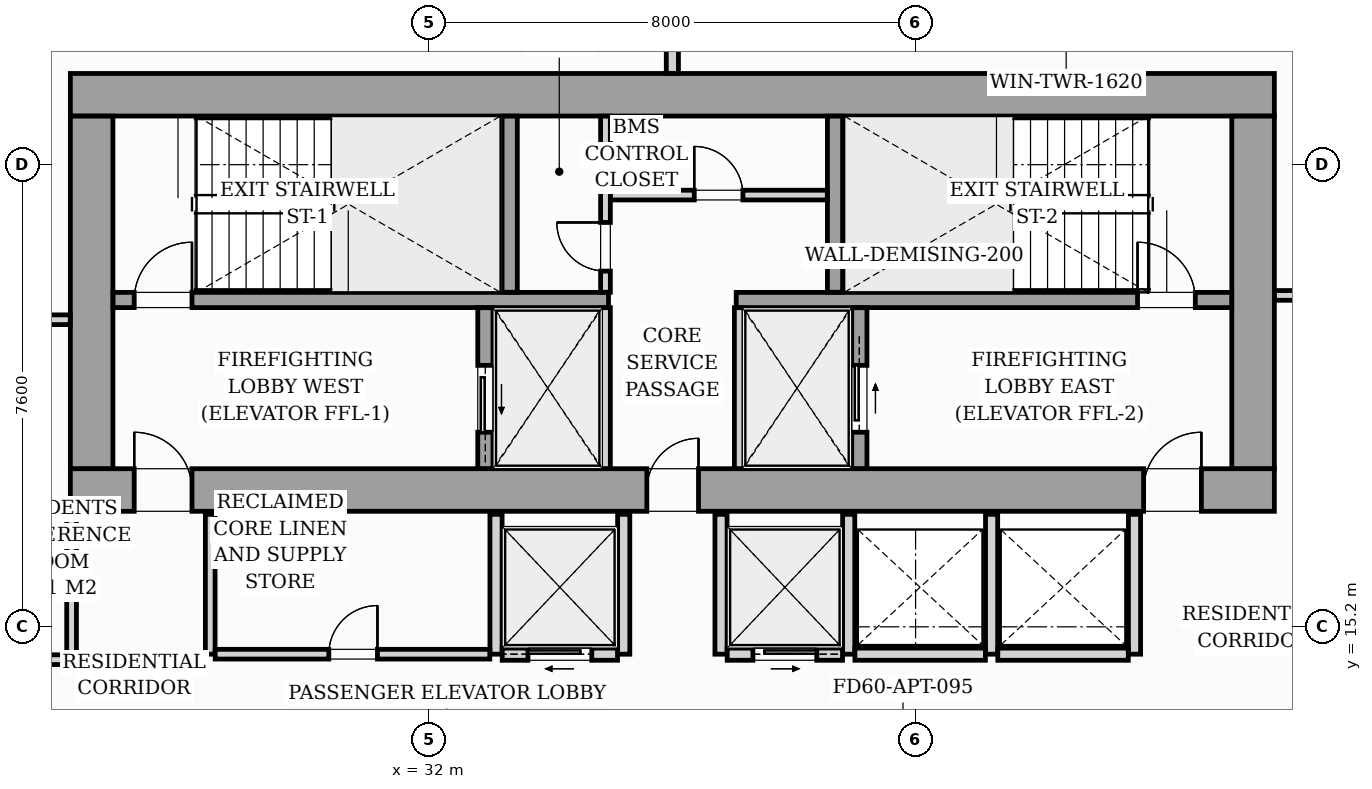
"""IFC4 building model, lengths in metres.
Left out: names, types, materials, properties, quantities, classifications, styles, units other than length and angle.
Written with IfcOpenShell. Run it as: python <this file> out.ifc"""

import sys

from ifc_helpers import new_model, si_unit, direction, frame, frame_2d, origin, origin_2d, place, context, subcontext, project, spatial, rectangle, i_section, extrude, source, transform, mapped, element, fill, save


model = new_model("IFC4")
c1 = context("Model", 3, precision=1e-05, world=origin(), true_north=direction((0.0, 1.0)))
c2 = subcontext(c1, "Body", "Model", "MODEL_VIEW")
j1 = project(units=[si_unit("LENGTHUNIT", "METRE"), si_unit("PLANEANGLEUNIT", "RADIAN")], contexts=[c1])
p1 = place(None, origin())
s1 = spatial("IfcSite", under=j1, at=p1, CompositionType="ELEMENT")
p2 = place(p1, origin())
s2 = spatial("IfcBuilding", under=s1, at=p2, CompositionType="ELEMENT")
p3 = place(p2, frame((0.0, 0.0, 143.8)))
s3 = spatial("IfcBuildingStorey", under=s2, at=p3, CompositionType="ELEMENT", Elevation=143.8)
m1 = source(origin(), c2, "Body", "SweptSolid", [
    extrude(i_section(OverallWidth=0.421, OverallDepth=0.465, WebThickness=0.045, FlangeThickness=0.073, FilletRadius=0.018, at=origin_2d()), origin(), (0.0, 0.0, 1.0), 3.196),
])
for number, where, z_axis, x_axis in (
    (1, (26.4, 17.4, 0.002), (0.0, 0.0, 1.0), (1.0, 0.0, 0.0)),
    (2, (33.12, 17.4, 0.002), (0.0, 0.0, 1.0), (1.0, 0.0, 0.0)),
    (3, (38.88, 17.4, 0.002), (0.0, 0.0, 1.0), (1.0, 0.0, 0.0)),
    (4, (45.6, 17.4, 0.002), (0.0, 0.0, 1.0), (1.0, 0.0, 0.0)),
    (5, (26.4, 24.0, 0.002), (0.0, 0.0, 1.0), (1.0, 0.0, 0.0)),
    (6, (33.12, 24.0, 0.002), (0.0, 0.0, 1.0), (1.0, 0.0, 0.0)),
    (7, (38.88, 24.0, 0.002), (0.0, 0.0, 1.0), (1.0, 0.0, 0.0)),
    (8, (45.6, 24.0, 0.002), (0.0, 0.0, 1.0), (1.0, 0.0, 0.0)),
):
    element("IfcColumn", number, at=place(p3, frame(where, z_axis=z_axis, x_axis=x_axis)), inside=s3, PredefinedType="PILASTER", context=c2, shape_type="MappedRepresentation", body=[
        mapped(m1, transform((0.0, 0.0, 0.0), scale=1.0)),
    ])
p4 = place(p3, frame((40.983, 25.727, 0.0), z_axis=(0.0, 0.0, 1.0), x_axis=(0.995395844771, -0.095849424686, 0.0)))
e9 = element("IfcWall", 9, at=p4, inside=s3, PredefinedType="STANDARD", context=c2, shape_type="SweptSolid", body=[
    extrude(rectangle(XDim=17.01, YDim=0.26, at=frame_2d((8.505, 0.0))), origin(), (0.0, 0.0, 1.0), 2.94),
])
p5 = place(p4, frame((9.55, 0.0, 0.0)))
e10 = element("IfcOpeningElement", 10, at=p5, cuts=e9, PredefinedType="OPENING", context=c2, shape_type="SweptSolid", body=[
    extrude(rectangle(XDim=1.8, YDim=2.06, at=frame_2d((0.9, 1.03))), frame((0.0, 0.14, 0.0), z_axis=(0.0, -1.0, 0.0), x_axis=(1.0, 0.0, 0.0)), (0.0, 0.0, 1.0), 0.28),
])
p6 = place(p4, frame((0.7, 0.0, 0.65)))
e11 = element("IfcOpeningElement", 11, at=p6, cuts=e9, PredefinedType="OPENING", context=c2, shape_type="SweptSolid", body=[
    extrude(rectangle(XDim=1.6, YDim=1.5, at=frame_2d((0.8, 0.75))), frame((0.0, 0.14, 0.0), z_axis=(0.0, -1.0, 0.0), x_axis=(1.0, 0.0, 0.0)), (0.0, 0.0, 1.0), 0.28),
])
p7 = place(p3, frame((26.1, 17.45, 0.0), z_axis=(0.0, 0.0, 1.0), x_axis=(1.0, 0.0, 0.0)))
e12 = element("IfcWall", 12, at=p7, inside=s3, PredefinedType="SHEAR", context=c2, shape_type="SweptSolid", body=[
    extrude(rectangle(XDim=19.8, YDim=0.7, at=frame_2d((9.9, 0.0))), origin(), (0.0, 0.0, 1.0), 3.2),
])
p8 = place(p7, frame((1.05, 0.0, 0.0)))
e13 = element("IfcOpeningElement", 13, at=p8, cuts=e12, PredefinedType="OPENING", context=c2, shape_type="SweptSolid", body=[
    extrude(rectangle(XDim=0.95, YDim=2.06, at=frame_2d((0.475, 1.03))), frame((0.0, 0.36, 0.0), z_axis=(0.0, -1.0, 0.0), x_axis=(1.0, 0.0, 0.0)), (0.0, 0.0, 1.0), 0.72),
])
p9 = place(p7, frame((9.48, 0.0, 0.0)))
e14 = element("IfcOpeningElement", 14, at=p9, cuts=e12, PredefinedType="OPENING", context=c2, shape_type="SweptSolid", body=[
    extrude(rectangle(XDim=0.85, YDim=2.0, at=frame_2d((0.425, 1.0))), frame((0.0, 0.36, 0.0), z_axis=(0.0, -1.0, 0.0), x_axis=(1.0, 0.0, 0.0)), (0.0, 0.0, 1.0), 0.72),
])
p10 = place(p7, frame((17.65, 0.0, 0.0)))
e15 = element("IfcOpeningElement", 15, at=p10, cuts=e12, PredefinedType="OPENING", context=c2, shape_type="SweptSolid", body=[
    extrude(rectangle(XDim=0.95, YDim=2.06, at=frame_2d((0.475, 1.03))), frame((0.0, 0.36, 0.0), z_axis=(0.0, -1.0, 0.0), x_axis=(1.0, 0.0, 0.0)), (0.0, 0.0, 1.0), 0.72),
])
p11 = place(p3, frame((26.1, 23.95, 0.0), z_axis=(0.0, 0.0, 1.0), x_axis=(1.0, 0.0, 0.0)))
e16 = element("IfcWall", 16, at=p11, inside=s3, PredefinedType="SHEAR", context=c2, shape_type="SweptSolid", body=[
    extrude(rectangle(XDim=19.8, YDim=0.7, at=frame_2d((9.9, 0.0))), origin(), (0.0, 0.0, 1.0), 3.2),
])
for number, where, z_axis, x_axis in (
    (17, (26.45, 17.802, 0.0), (0.0, 0.0, 1.0), (0.0, 1.0, 0.0)),
    (18, (45.55, 17.802, 0.0), (0.0, 0.0, 1.0), (0.0, 1.0, 0.0)),
):
    element("IfcWall", number, at=place(p3, frame(where, z_axis=z_axis, x_axis=x_axis)), inside=s3, PredefinedType="SHEAR", context=c2, shape_type="SweptSolid", body=[
        extrude(rectangle(XDim=5.796, YDim=0.7, at=frame_2d((2.898, 0.0))), origin(), (0.0, 0.0, 1.0), 3.2),
    ])
p12 = place(p3, frame((26.802, 20.575, 0.0), z_axis=(0.0, 0.0, 1.0), x_axis=(1.0, 0.0, 0.0)))
e19 = element("IfcWall", 19, at=p12, inside=s3, PredefinedType="SOLIDWALL", context=c2, shape_type="SweptSolid", body=[
    extrude(rectangle(XDim=8.148, YDim=0.25, at=frame_2d((4.074, 0.0))), origin(), (0.0, 0.0, 1.0), 3.2),
])
p13 = place(p12, frame((0.348, 0.0, 0.0)))
e20 = element("IfcOpeningElement", 20, at=p13, cuts=e19, PredefinedType="OPENING", context=c2, shape_type="SweptSolid", body=[
    extrude(rectangle(XDim=0.95, YDim=2.06, at=frame_2d((0.475, 1.03))), frame((0.0, 0.135, 0.0), z_axis=(0.0, -1.0, 0.0), x_axis=(1.0, 0.0, 0.0)), (0.0, 0.0, 1.0), 0.27),
])
p14 = place(p3, frame((37.05, 20.575, 0.0), z_axis=(0.0, 0.0, 1.0), x_axis=(1.0, 0.0, 0.0)))
e21 = element("IfcWall", 21, at=p14, inside=s3, PredefinedType="SOLIDWALL", context=c2, shape_type="SweptSolid", body=[
    extrude(rectangle(XDim=8.148, YDim=0.25, at=frame_2d((4.074, 0.0))), origin(), (0.0, 0.0, 1.0), 3.2),
])
p15 = place(p14, frame((6.6, 0.0, 0.0)))
e22 = element("IfcOpeningElement", 22, at=p15, cuts=e21, PredefinedType="OPENING", context=c2, shape_type="SweptSolid", body=[
    extrude(rectangle(XDim=0.95, YDim=2.06, at=frame_2d((0.475, 1.03))), frame((0.0, 0.135, 0.0), z_axis=(0.0, -1.0, 0.0), x_axis=(1.0, 0.0, 0.0)), (0.0, 0.0, 1.0), 0.27),
])
for number, where, z_axis, x_axis in (
    (23, (33.325, 20.702, 0.0), (0.0, 0.0, 1.0), (0.0, 1.0, 0.0)),
    (24, (38.675, 20.702, 0.0), (0.0, 0.0, 1.0), (0.0, 1.0, 0.0)),
):
    element("IfcWall", number, at=place(p3, frame(where, z_axis=z_axis, x_axis=x_axis)), inside=s3, PredefinedType="SOLIDWALL", context=c2, shape_type="SweptSolid", body=[
        extrude(rectangle(XDim=2.896, YDim=0.25, at=frame_2d((1.448, 0.0))), origin(), (0.0, 0.0, 1.0), 3.2),
    ])
p16 = place(p3, frame((32.925, 17.802, 0.0), z_axis=(0.0, 0.0, 1.0), x_axis=(0.0, 1.0, 0.0)))
e25 = element("IfcWall", 25, at=p16, inside=s3, PredefinedType="SOLIDWALL", context=c2, shape_type="SweptSolid", body=[
    extrude(rectangle(XDim=2.646, YDim=0.25, at=frame_2d((1.323, 0.0))), origin(), (0.0, 0.0, 1.0), 3.2),
])
p17 = place(p16, frame((0.598, 0.0, 0.0)))
e26 = element("IfcOpeningElement", 26, at=p17, cuts=e25, PredefinedType="OPENING", context=c2, shape_type="SweptSolid", body=[
    extrude(rectangle(XDim=1.1, YDim=2.08, at=frame_2d((0.55, 1.04))), frame((0.0, 0.135, 0.0), z_axis=(0.0, -1.0, 0.0), x_axis=(1.0, 0.0, 0.0)), (0.0, 0.0, 1.0), 0.27),
])
for number, where, z_axis, x_axis in (
    (27, (34.9, 17.802, 0.0), (0.0, 0.0, 1.0), (0.0, 1.0, 0.0)),
    (28, (37.1, 17.802, 0.0), (0.0, 0.0, 1.0), (0.0, 1.0, 0.0)),
):
    element("IfcWall", number, at=place(p3, frame(where, z_axis=z_axis, x_axis=x_axis)), inside=s3, PredefinedType="PARTITIONING", context=c2, shape_type="SweptSolid", body=[
        extrude(rectangle(XDim=2.646, YDim=0.16, at=frame_2d((1.323, 0.0))), origin(), (0.0, 0.0, 1.0), 2.94),
    ])
p18 = place(p3, frame((39.075, 17.802, 0.0), z_axis=(0.0, 0.0, 1.0), x_axis=(0.0, 1.0, 0.0)))
e29 = element("IfcWall", 29, at=p18, inside=s3, PredefinedType="SOLIDWALL", context=c2, shape_type="SweptSolid", body=[
    extrude(rectangle(XDim=2.646, YDim=0.25, at=frame_2d((1.323, 0.0))), origin(), (0.0, 0.0, 1.0), 3.2),
])
p19 = place(p18, frame((0.598, 0.0, 0.0)))
e30 = element("IfcOpeningElement", 30, at=p19, cuts=e29, PredefinedType="OPENING", context=c2, shape_type="SweptSolid", body=[
    extrude(rectangle(XDim=1.1, YDim=2.08, at=frame_2d((0.55, 1.04))), frame((0.0, 0.135, 0.0), z_axis=(0.0, -1.0, 0.0), x_axis=(1.0, 0.0, 0.0)), (0.0, 0.0, 1.0), 0.27),
])
p20 = place(p3, frame((34.9, 20.702, 0.0), z_axis=(0.0, 0.0, 1.0), x_axis=(0.0, 1.0, 0.0)))
e31 = element("IfcWall", 31, at=p20, inside=s3, PredefinedType="PARTITIONING", context=c2, shape_type="SweptSolid", body=[
    extrude(rectangle(XDim=2.896, YDim=0.16, at=frame_2d((1.448, 0.0))), origin(), (0.0, 0.0, 1.0), 2.94),
])
p21 = place(p20, frame((0.348, 0.0, 0.0)))
e32 = element("IfcOpeningElement", 32, at=p21, cuts=e31, PredefinedType="OPENING", context=c2, shape_type="SweptSolid", body=[
    extrude(rectangle(XDim=0.8, YDim=2.05, at=frame_2d((0.4, 1.025))), frame((0.0, 0.09, 0.0), z_axis=(0.0, -1.0, 0.0), x_axis=(1.0, 0.0, 0.0)), (0.0, 0.0, 1.0), 0.18),
])
p22 = place(p3, frame((34.982, 22.3, 0.0), z_axis=(0.0, 0.0, 1.0), x_axis=(1.0, 0.0, 0.0)))
e33 = element("IfcWall", 33, at=p22, inside=s3, PredefinedType="PARTITIONING", context=c2, shape_type="SweptSolid", body=[
    extrude(rectangle(XDim=3.566, YDim=0.16, at=frame_2d((1.783, 0.0))), origin(), (0.0, 0.0, 1.0), 2.94),
])
p23 = place(p22, frame((1.378, 0.0, 0.0)))
e34 = element("IfcOpeningElement", 34, at=p23, cuts=e33, PredefinedType="OPENING", context=c2, shape_type="SweptSolid", body=[
    extrude(rectangle(XDim=0.8, YDim=2.05, at=frame_2d((0.4, 1.025))), frame((0.0, 0.09, 0.0), z_axis=(0.0, -1.0, 0.0), x_axis=(1.0, 0.0, 0.0)), (0.0, 0.0, 1.0), 0.18),
])
p24 = place(p3, frame((28.4, 14.75, 0.0), z_axis=(0.0, 0.0, 1.0), x_axis=(0.0, 1.0, 0.0)))
e35 = element("IfcWall", 35, at=p24, inside=s3, PredefinedType="PARTITIONING", context=c2, shape_type="SweptSolid", body=[
    extrude(rectangle(XDim=2.3, YDim=0.16, at=frame_2d((1.15, 0.0))), origin(), (0.0, 0.0, 1.0), 2.94),
])
p25 = place(p3, frame((33.1, 14.75, 0.0), z_axis=(0.0, 0.0, 1.0), x_axis=(0.0, 1.0, 0.0)))
e36 = element("IfcWall", 36, at=p25, inside=s3, PredefinedType="PARTITIONING", context=c2, shape_type="SweptSolid", body=[
    extrude(rectangle(XDim=2.3, YDim=0.2, at=frame_2d((1.15, 0.0))), origin(), (0.0, 0.0, 1.0), 2.94),
])
p26 = place(p3, frame((28.482, 14.75, 0.0), z_axis=(0.0, 0.0, 1.0), x_axis=(1.0, 0.0, 0.0)))
e37 = element("IfcWall", 37, at=p26, inside=s3, PredefinedType="PARTITIONING", context=c2, shape_type="SweptSolid", body=[
    extrude(rectangle(XDim=4.516, YDim=0.16, at=frame_2d((2.258, 0.0))), origin(), (0.0, 0.0, 1.0), 2.94),
])
p27 = place(p26, frame((1.868, 0.0, 0.0)))
e38 = element("IfcOpeningElement", 38, at=p27, cuts=e37, PredefinedType="OPENING", context=c2, shape_type="SweptSolid", body=[
    extrude(rectangle(XDim=0.8, YDim=2.05, at=frame_2d((0.4, 1.025))), frame((0.0, 0.09, 0.0), z_axis=(0.0, -1.0, 0.0), x_axis=(1.0, 0.0, 0.0)), (0.0, 0.0, 1.0), 0.18),
])
p28 = place(p3, frame((35.2, 14.75, 0.0), z_axis=(0.0, 0.0, 1.0), x_axis=(0.0, 1.0, 0.0)))
e39 = element("IfcWall", 39, at=p28, inside=s3, PredefinedType="PARTITIONING", context=c2, shape_type="SweptSolid", body=[
    extrude(rectangle(XDim=2.3, YDim=0.2, at=frame_2d((1.15, 0.0))), origin(), (0.0, 0.0, 1.0), 2.94),
])
p29 = place(p3, frame((33.202, 14.75, 0.0), z_axis=(0.0, 0.0, 1.0), x_axis=(1.0, 0.0, 0.0)))
e40 = element("IfcWall", 40, at=p29, inside=s3, PredefinedType="PARTITIONING", context=c2, shape_type="SweptSolid", body=[
    extrude(rectangle(XDim=1.896, YDim=0.2, at=frame_2d((0.948, 0.0))), origin(), (0.0, 0.0, 1.0), 2.94),
])
p30 = place(p29, frame((0.423, 0.0, 0.0)))
e41 = element("IfcOpeningElement", 41, at=p30, cuts=e40, PredefinedType="OPENING", context=c2, shape_type="SweptSolid", body=[
    extrude(rectangle(XDim=1.05, YDim=2.08, at=frame_2d((0.525, 1.04))), frame((0.0, 0.11, 0.0), z_axis=(0.0, -1.0, 0.0), x_axis=(1.0, 0.0, 0.0)), (0.0, 0.0, 1.0), 0.22),
])
for number, where, z_axis, x_axis in (
    (42, (36.8, 14.75, 0.0), (0.0, 0.0, 1.0), (0.0, 1.0, 0.0)),
    (43, (38.9, 14.75, 0.0), (0.0, 0.0, 1.0), (0.0, 1.0, 0.0)),
):
    element("IfcWall", number, at=place(p3, frame(where, z_axis=z_axis, x_axis=x_axis)), inside=s3, PredefinedType="PARTITIONING", context=c2, shape_type="SweptSolid", body=[
        extrude(rectangle(XDim=2.3, YDim=0.2, at=frame_2d((1.15, 0.0))), origin(), (0.0, 0.0, 1.0), 2.94),
    ])
p31 = place(p3, frame((36.902, 14.75, 0.0), z_axis=(0.0, 0.0, 1.0), x_axis=(1.0, 0.0, 0.0)))
e44 = element("IfcWall", 44, at=p31, inside=s3, PredefinedType="PARTITIONING", context=c2, shape_type="SweptSolid", body=[
    extrude(rectangle(XDim=1.896, YDim=0.2, at=frame_2d((0.948, 0.0))), origin(), (0.0, 0.0, 1.0), 2.94),
])
p32 = place(p31, frame((0.423, 0.0, 0.0)))
e45 = element("IfcOpeningElement", 45, at=p32, cuts=e44, PredefinedType="OPENING", context=c2, shape_type="SweptSolid", body=[
    extrude(rectangle(XDim=1.05, YDim=2.08, at=frame_2d((0.525, 1.04))), frame((0.0, 0.11, 0.0), z_axis=(0.0, -1.0, 0.0), x_axis=(1.0, 0.0, 0.0)), (0.0, 0.0, 1.0), 0.22),
])
for number, where, z_axis, x_axis in (
    (46, (41.25, 14.75, 0.0), (0.0, 0.0, 1.0), (0.0, 1.0, 0.0)),
    (47, (43.6, 14.75, 0.0), (0.0, 0.0, 1.0), (0.0, 1.0, 0.0)),
):
    element("IfcWall", number, at=place(p3, frame(where, z_axis=z_axis, x_axis=x_axis)), inside=s3, PredefinedType="PARTITIONING", context=c2, shape_type="SweptSolid", body=[
        extrude(rectangle(XDim=2.3, YDim=0.2, at=frame_2d((1.15, 0.0))), origin(), (0.0, 0.0, 1.0), 2.94),
    ])
for number, where, z_axis, x_axis in (
    (48, (39.002, 14.75, 0.0), (0.0, 0.0, 1.0), (1.0, 0.0, 0.0)),
    (49, (41.352, 14.75, 0.0), (0.0, 0.0, 1.0), (1.0, 0.0, 0.0)),
):
    element("IfcWall", number, at=place(p3, frame(where, z_axis=z_axis, x_axis=x_axis)), inside=s3, PredefinedType="PARTITIONING", context=c2, shape_type="SweptSolid", body=[
        extrude(rectangle(XDim=2.146, YDim=0.2, at=frame_2d((1.073, 0.0))), origin(), (0.0, 0.0, 1.0), 2.94),
    ])
p33 = place(p3, frame((36.0, 24.302, 0.0), z_axis=(0.0, 0.0, 1.0), x_axis=(0.0, 1.0, 0.0)))
e50 = element("IfcWall", 50, at=p33, inside=s3, PredefinedType="PARTITIONING", context=c2, shape_type="SweptSolid", body=[
    extrude(rectangle(XDim=1.955, YDim=0.2, at=frame_2d((0.978, 0.0))), origin(), (0.0, 0.0, 1.0), 2.94),
])
p34 = place(p3, frame((45.902, 20.65, 0.0), z_axis=(0.0, 0.0, 1.0), x_axis=(1.0, 0.0, 0.0)))
e51 = element("IfcWall", 51, at=p34, inside=s3, PredefinedType="PARTITIONING", context=c2, shape_type="SweptSolid", body=[
    extrude(rectangle(XDim=1.716, YDim=0.16, at=frame_2d((0.858, 0.0))), origin(), (0.0, 0.0, 1.0), 2.94),
])
p35 = place(p3, frame((24.182, 20.25, 0.0), z_axis=(0.0, 0.0, 1.0), x_axis=(1.0, 0.0, 0.0)))
e52 = element("IfcWall", 52, at=p35, inside=s3, PredefinedType="PARTITIONING", context=c2, shape_type="SweptSolid", body=[
    extrude(rectangle(XDim=1.916, YDim=0.16, at=frame_2d((0.958, 0.0))), origin(), (0.0, 0.0, 1.0), 2.94),
])
p36 = place(p3, frame((26.12, 14.66, 0.0), z_axis=(0.0, 0.0, 1.0), x_axis=(0.0, 1.0, 0.0)))
e53 = element("IfcWall", 53, at=p36, inside=s3, PredefinedType="PARTITIONING", context=c2, shape_type="SweptSolid", body=[
    extrude(rectangle(XDim=2.438, YDim=0.16, at=frame_2d((1.219, 0.0))), origin(), (0.0, 0.0, 1.0), 2.94),
])
p37 = place(p3, frame((24.182, 14.66, 0.0), z_axis=(0.0, 0.0, 1.0), x_axis=(1.0, 0.0, 0.0)))
e54 = element("IfcWall", 54, at=p37, inside=s3, PredefinedType="PARTITIONING", context=c2, shape_type="SweptSolid", body=[
    extrude(rectangle(XDim=1.856, YDim=0.16, at=frame_2d((0.928, 0.0))), origin(), (0.0, 0.0, 1.0), 2.94),
])
m2 = source(origin(), c2, "Body", "SweptSolid", [
    extrude(rectangle(XDim=0.95, YDim=2.06, at=frame_2d((0.475, 1.03))), frame((0.0, 0.025, 0.0), z_axis=(0.0, -1.0, 0.0), x_axis=(1.0, 0.0, 0.0)), (0.0, 0.0, 1.0), 0.05),
])
p38 = place(p8, origin())
e55 = element("IfcDoor", 55, at=p38, inside=s3, OperationType="SINGLE_SWING_LEFT", PredefinedType="DOOR", context=c2, shape_type="MappedRepresentation", body=[
    mapped(m2, transform((0.0, 0.0, 0.0), scale=1.0)),
])
fill(e13, e55)
m3 = source(origin(), c2, "Body", "SweptSolid", [
    extrude(rectangle(XDim=0.85, YDim=2.0, at=frame_2d((0.425, 1.0))), frame((0.0, 0.025, 0.0), z_axis=(0.0, -1.0, 0.0), x_axis=(1.0, 0.0, 0.0)), (0.0, 0.0, 1.0), 0.05),
])
p39 = place(p9, origin())
e56 = element("IfcDoor", 56, at=p39, inside=s3, OperationType="SINGLE_SWING_RIGHT", PredefinedType="DOOR", context=c2, shape_type="MappedRepresentation", body=[
    mapped(m3, transform((0.0, 0.0, 0.0), scale=1.0)),
])
fill(e14, e56)
p40 = place(p10, origin())
e57 = element("IfcDoor", 57, at=p40, inside=s3, OperationType="SINGLE_SWING_RIGHT", PredefinedType="DOOR", context=c2, shape_type="MappedRepresentation", body=[
    mapped(m2, transform((0.0, 0.0, 0.0), scale=1.0)),
])
fill(e15, e57)
p41 = place(p13, origin())
e58 = element("IfcDoor", 58, at=p41, inside=s3, OperationType="SINGLE_SWING_RIGHT", PredefinedType="DOOR", context=c2, shape_type="MappedRepresentation", body=[
    mapped(m2, transform((0.0, 0.0, 0.0), scale=1.0)),
])
fill(e20, e58)
p42 = place(p15, origin())
e59 = element("IfcDoor", 59, at=p42, inside=s3, OperationType="SINGLE_SWING_LEFT", PredefinedType="DOOR", context=c2, shape_type="MappedRepresentation", body=[
    mapped(m2, transform((0.0, 0.0, 0.0), scale=1.0)),
])
fill(e22, e59)
m4 = source(origin(), c2, "Body", "SweptSolid", [
    extrude(rectangle(XDim=1.1, YDim=2.08, at=frame_2d((0.55, 1.04))), frame((0.0, 0.025, 0.0), z_axis=(0.0, -1.0, 0.0), x_axis=(1.0, 0.0, 0.0)), (0.0, 0.0, 1.0), 0.05),
])
p43 = place(p17, origin())
e60 = element("IfcDoor", 60, at=p43, inside=s3, OperationType="SLIDING_TO_LEFT", PredefinedType="DOOR", context=c2, shape_type="MappedRepresentation", body=[
    mapped(m4, transform((0.0, 0.0, 0.0), scale=1.0)),
])
fill(e26, e60)
p44 = place(p19, origin())
e61 = element("IfcDoor", 61, at=p44, inside=s3, OperationType="SLIDING_TO_RIGHT", PredefinedType="DOOR", context=c2, shape_type="MappedRepresentation", body=[
    mapped(m4, transform((0.0, 0.0, 0.0), scale=1.0)),
])
fill(e30, e61)
m5 = source(origin(), c2, "Body", "SweptSolid", [
    extrude(rectangle(XDim=0.8, YDim=2.05, at=frame_2d((0.4, 1.025))), frame((0.0, 0.025, 0.0), z_axis=(0.0, -1.0, 0.0), x_axis=(1.0, 0.0, 0.0)), (0.0, 0.0, 1.0), 0.05),
])
p45 = place(p21, origin())
e62 = element("IfcDoor", 62, at=p45, inside=s3, OperationType="SINGLE_SWING_RIGHT", PredefinedType="DOOR", context=c2, shape_type="MappedRepresentation", body=[
    mapped(m5, transform((0.0, 0.0, 0.0), scale=1.0)),
])
fill(e32, e62)
p46 = place(p23, origin())
e63 = element("IfcDoor", 63, at=p46, inside=s3, OperationType="SINGLE_SWING_LEFT", PredefinedType="DOOR", context=c2, shape_type="MappedRepresentation", body=[
    mapped(m5, transform((0.0, 0.0, 0.0), scale=1.0)),
])
fill(e34, e63)
p47 = place(p27, origin())
e64 = element("IfcDoor", 64, at=p47, inside=s3, OperationType="SINGLE_SWING_RIGHT", PredefinedType="DOOR", context=c2, shape_type="MappedRepresentation", body=[
    mapped(m5, transform((0.0, 0.0, 0.0), scale=1.0)),
])
fill(e38, e64)
m6 = source(origin(), c2, "Body", "SweptSolid", [
    extrude(rectangle(XDim=1.05, YDim=2.08, at=frame_2d((0.525, 1.04))), frame((0.0, 0.025, 0.0), z_axis=(0.0, -1.0, 0.0), x_axis=(1.0, 0.0, 0.0)), (0.0, 0.0, 1.0), 0.05),
])
p48 = place(p30, origin())
e65 = element("IfcDoor", 65, at=p48, inside=s3, OperationType="SLIDING_TO_LEFT", PredefinedType="DOOR", context=c2, shape_type="MappedRepresentation", body=[
    mapped(m6, transform((0.0, 0.0, 0.0), scale=1.0)),
])
fill(e41, e65)
p49 = place(p32, origin())
e66 = element("IfcDoor", 66, at=p49, inside=s3, OperationType="SLIDING_TO_RIGHT", PredefinedType="DOOR", context=c2, shape_type="MappedRepresentation", body=[
    mapped(m6, transform((0.0, 0.0, 0.0), scale=1.0)),
])
fill(e45, e66)
save(model, sys.argv[1])
